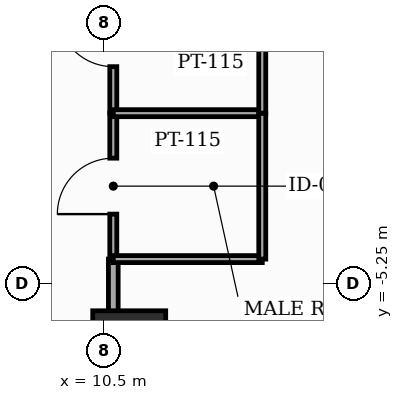
"""IFC4 building model, lengths in metres.
Left out: names, types, materials, properties, quantities, classifications, styles, units other than length and angle.
Written with IfcOpenShell. Run it as: python <this file> out.ifc"""

import sys

from ifc_helpers import new_model, si_unit, direction, frame, frame_2d, origin, origin_2d, place, context, subcontext, project, spatial, rectangle, extrude, element, fill, save


model = new_model("IFC4")
c1 = context("Model", 3, precision=1e-05, world=origin(), true_north=direction((0.0, 1.0)))
c2 = subcontext(c1, "Body", "Model", "MODEL_VIEW")
j1 = project(units=[si_unit("LENGTHUNIT", "METRE"), si_unit("PLANEANGLEUNIT", "RADIAN")], contexts=[c1])
p1 = place(None, origin())
s1 = spatial("IfcSite", under=j1, at=p1, CompositionType="ELEMENT")
p2 = place(p1, origin())
s2 = spatial("IfcBuilding", under=s1, at=p2, CompositionType="ELEMENT")
p3 = place(p2, frame((0.0, 0.0, 158.3)))
s3 = spatial("IfcBuildingStorey", under=s2, at=p3, CompositionType="ELEMENT", Elevation=158.3)
p4 = place(p3, frame((10.912, -6.3, 0.0), z_axis=(0.0, 0.0, 1.0), x_axis=(1.0, 0.0, 0.0)))
e1 = element("IfcColumn", 1, at=p4, inside=s3, PredefinedType="COLUMN", context=c2, shape_type="SweptSolid", body=[
    extrude(rectangle(XDim=1.2, YDim=1.2, at=origin_2d()), origin(), (0.0, 0.0, 1.0), 3.7),
])
p5 = place(p3, frame((10.65, -4.85, 0.0), z_axis=(0.0, 0.0, 1.0), x_axis=(0.0, 1.0, 0.0)))
e2 = element("IfcWall", 2, at=p5, inside=s3, PredefinedType="PARTITIONING", context=c2, shape_type="SweptSolid", body=[
    extrude(rectangle(XDim=2.4, YDim=0.115, at=frame_2d((1.2, 0.0))), origin(), (0.0, 0.0, 1.0), 3.5),
])
p6 = place(p5, frame((0.74, 0.0, 0.0)))
e3 = element("IfcOpeningElement", 3, at=p6, cuts=e2, PredefinedType="OPENING", context=c2, shape_type="SweptSolid", body=[
    extrude(rectangle(XDim=0.92, YDim=2.1, at=frame_2d((0.46, 1.05))), frame((0.0, 0.067, 0.0), z_axis=(0.0, -1.0, 0.0), x_axis=(1.0, 0.0, 0.0)), (0.0, 0.0, 1.0), 0.135),
])
p7 = place(p3, frame((10.65, -2.45, 0.0), z_axis=(0.0, 0.0, 1.0), x_axis=(0.0, 1.0, 0.0)))
e4 = element("IfcWall", 4, at=p7, inside=s3, PredefinedType="PARTITIONING", context=c2, shape_type="SweptSolid", body=[
    extrude(rectangle(XDim=2.45, YDim=0.115, at=frame_2d((1.225, 0.0))), origin(), (0.0, 0.0, 1.0), 2.885),
])
p8 = place(p7, frame((0.765, 0.0, 0.0)))
e5 = element("IfcOpeningElement", 5, at=p8, cuts=e4, PredefinedType="OPENING", context=c2, shape_type="SweptSolid", body=[
    extrude(rectangle(XDim=0.92, YDim=2.1, at=frame_2d((0.46, 1.05))), frame((0.0, 0.067, 0.0), z_axis=(0.0, -1.0, 0.0), x_axis=(1.0, 0.0, 0.0)), (0.0, 0.0, 1.0), 0.135),
])
p9 = place(p3, frame((10.65, -10.15, 0.0), z_axis=(0.0, 0.0, 1.0), x_axis=(0.0, 1.0, 0.0)))
e6 = element("IfcWall", 6, at=p9, inside=s3, PredefinedType="PARTITIONING", context=c2, shape_type="SweptSolid", body=[
    extrude(rectangle(XDim=5.3, YDim=0.16, at=frame_2d((2.65, 0.0))), origin(), (0.0, 0.0, 1.0), 2.885),
])
p10 = place(p9, frame((0.56, 0.0, 0.0)))
e7 = element("IfcOpeningElement", 7, at=p10, cuts=e6, PredefinedType="OPENING", context=c2, shape_type="SweptSolid", body=[
    extrude(rectangle(XDim=1.0, YDim=2.15, at=frame_2d((0.5, 1.075))), frame((0.0, 0.09, 0.0), z_axis=(0.0, -1.0, 0.0), x_axis=(1.0, 0.0, 0.0)), (0.0, 0.0, 1.0), 0.18),
])
for number, where, z_axis, x_axis in (
    (8, (13.1, -2.45, 0.0), (0.0, 0.0, 1.0), (-1.0, 0.0, 0.0)),
    (9, (10.65, -4.85, 0.0), (0.0, 0.0, 1.0), (1.0, 0.0, 0.0)),
):
    element("IfcWall", number, at=place(p3, frame(where, z_axis=z_axis, x_axis=x_axis)), inside=s3, PredefinedType="PARTITIONING", context=c2, shape_type="SweptSolid", body=[
        extrude(rectangle(XDim=2.45, YDim=0.115, at=frame_2d((1.225, 0.0))), origin(), (0.0, 0.0, 1.0), 2.885),
    ])
p11 = place(p3, frame((13.1, -4.85, 0.0), z_axis=(0.0, 0.0, 1.0), x_axis=(0.0, 1.0, 0.0)))
e10 = element("IfcWall", 10, at=p11, inside=s3, PredefinedType="PARTITIONING", context=c2, shape_type="SweptSolid", body=[
    extrude(rectangle(XDim=2.4, YDim=0.115, at=frame_2d((1.2, 0.0))), origin(), (0.0, 0.0, 1.0), 3.5),
])
p12 = place(p3, frame((13.1, -2.45, 0.0), z_axis=(0.0, 0.0, 1.0), x_axis=(0.0, 1.0, 0.0)))
e11 = element("IfcWall", 11, at=p12, inside=s3, PredefinedType="PARTITIONING", context=c2, shape_type="SweptSolid", body=[
    extrude(rectangle(XDim=2.45, YDim=0.115, at=frame_2d((1.225, 0.0))), origin(), (0.0, 0.0, 1.0), 2.885),
])
p13 = place(p6, origin())
e12 = element("IfcDoor", 12, at=p13, inside=s3, OperationType="SINGLE_SWING_LEFT", PredefinedType="DOOR", context=c2, shape_type="SweptSolid", body=[
    extrude(rectangle(XDim=0.92, YDim=2.1, at=frame_2d((0.46, 1.05))), frame((0.0, 0.025, 0.0), z_axis=(0.0, -1.0, 0.0), x_axis=(1.0, 0.0, 0.0)), (0.0, 0.0, 1.0), 0.05),
])
fill(e3, e12)
p14 = place(p8, origin())
e13 = element("IfcDoor", 13, at=p14, inside=s3, OperationType="SINGLE_SWING_RIGHT", PredefinedType="DOOR", context=c2, shape_type="SweptSolid", body=[
    extrude(rectangle(XDim=0.92, YDim=2.1, at=frame_2d((0.46, 1.05))), frame((0.0, 0.025, 0.0), z_axis=(0.0, -1.0, 0.0), x_axis=(1.0, 0.0, 0.0)), (0.0, 0.0, 1.0), 0.05),
])
fill(e5, e13)
save(model, sys.argv[1])
